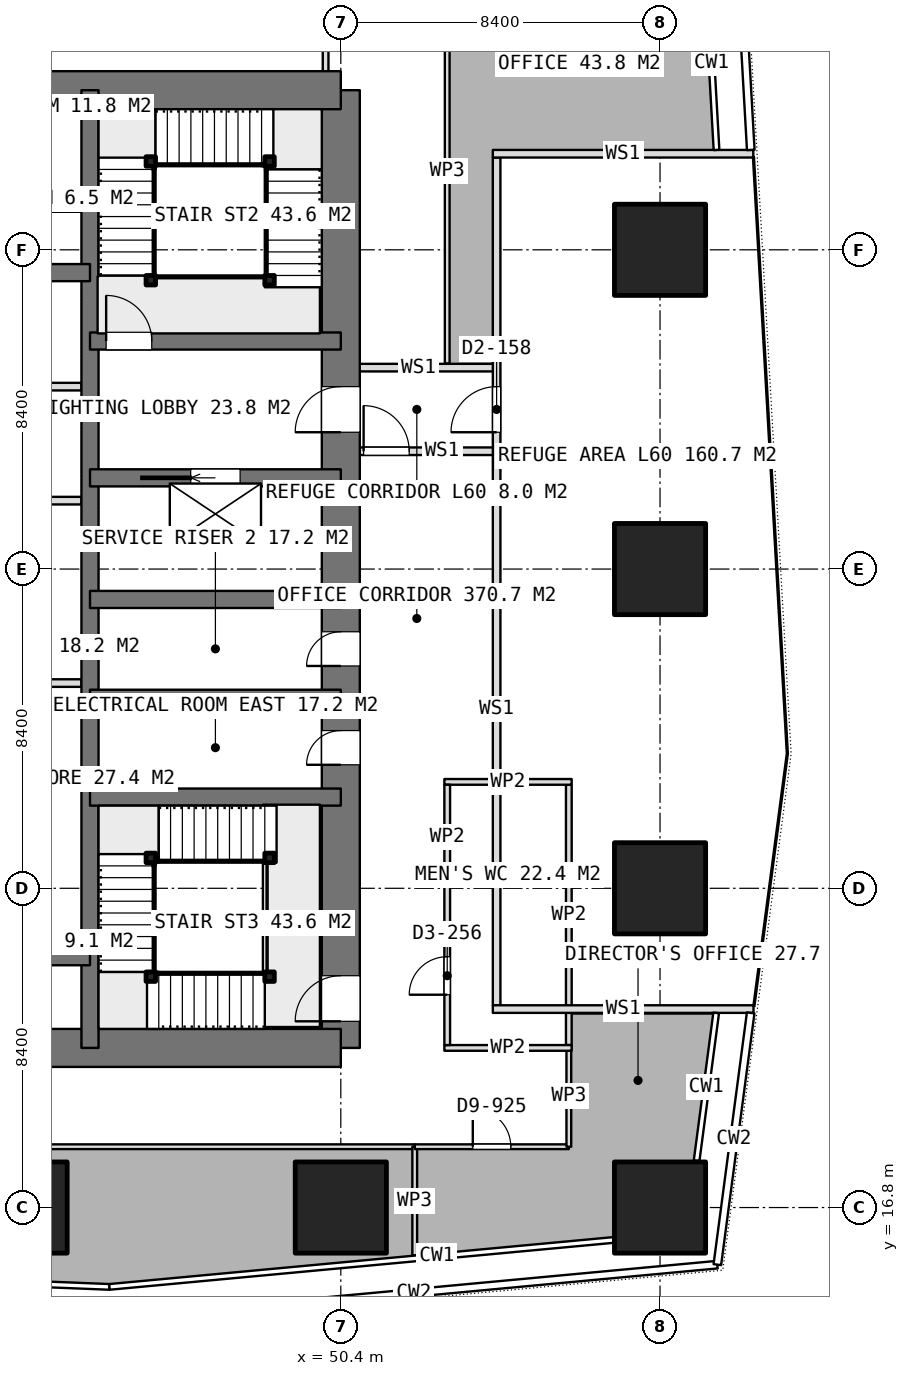
"""IFC4 building model, lengths in metres.
Left out: names, types, materials, properties, quantities, classifications, styles, units other than length and angle.
Written with IfcOpenShell. Run it as: python <this file> out.ifc"""

import sys

from ifc_helpers import new_model, si_unit, direction, frame, frame_2d, origin, origin_2d, place, context, subcontext, project, spatial, rectangle, extrude, element, fill, save


model = new_model("IFC4")
c1 = context("Model", 3, precision=1e-05, world=origin(), true_north=direction((0.0, 1.0)))
c2 = subcontext(c1, "Body", "Model", "MODEL_VIEW")
j1 = project(units=[si_unit("LENGTHUNIT", "METRE"), si_unit("PLANEANGLEUNIT", "RADIAN")], contexts=[c1])
p1 = place(None, origin())
s1 = spatial("IfcSite", under=j1, at=p1, CompositionType="ELEMENT")
p2 = place(p1, origin())
s2 = spatial("IfcBuilding", under=s1, at=p2, CompositionType="ELEMENT")
p3 = place(p2, frame((0.0, 0.0, 236.45)))
s3 = spatial("IfcBuildingStorey", under=s2, at=p3, CompositionType="ELEMENT", Elevation=236.45)
for number, where, z_axis, x_axis in (
    (1, (40.0, 21.0, 0.0), (0.0, 0.0, 1.0), (1.0, 0.0, 0.0)),
    (2, (40.0, 46.2, 0.0), (0.0, 0.0, 1.0), (1.0, 0.0, 0.0)),
):
    element("IfcWall", number, at=place(p3, frame(where, z_axis=z_axis, x_axis=x_axis)), inside=s3, PredefinedType="SHEAR", context=c2, shape_type="SweptSolid", body=[
        extrude(rectangle(XDim=10.4, YDim=1.0, at=frame_2d((5.2, 0.0))), origin(), (0.0, 0.0, 1.0), 3.75),
    ])
p4 = place(p3, frame((50.4, 21.0, 0.0), z_axis=(0.0, 0.0, 1.0), x_axis=(0.0, 1.0, 0.0)))
e3 = element("IfcWall", 3, at=p4, inside=s3, PredefinedType="SHEAR", context=c2, shape_type="SweptSolid", body=[
    extrude(rectangle(XDim=25.2, YDim=1.0, at=frame_2d((12.6, 0.0))), origin(), (0.0, 0.0, 1.0), 3.75),
])
p5 = place(p4, frame((16.2, 0.0, 0.0)))
e4 = element("IfcOpeningElement", 4, at=p5, cuts=e3, PredefinedType="OPENING", context=c2, shape_type="SweptSolid", body=[
    extrude(rectangle(XDim=1.2, YDim=2.1, at=frame_2d((0.6, 1.05))), frame((0.0, 0.51, 0.0), z_axis=(0.0, -1.0, 0.0), x_axis=(1.0, 0.0, 0.0)), (0.0, 0.0, 1.0), 1.02),
])
p6 = place(p4, frame((10.05, 0.0, 0.0)))
e5 = element("IfcOpeningElement", 5, at=p6, cuts=e3, PredefinedType="OPENING", context=c2, shape_type="SweptSolid", body=[
    extrude(rectangle(XDim=0.9, YDim=2.1, at=frame_2d((0.45, 1.05))), frame((0.0, 0.51, 0.0), z_axis=(0.0, -1.0, 0.0), x_axis=(1.0, 0.0, 0.0)), (0.0, 0.0, 1.0), 1.02),
])
p7 = place(p4, frame((7.45, 0.0, 0.0)))
e6 = element("IfcOpeningElement", 6, at=p7, cuts=e3, PredefinedType="OPENING", context=c2, shape_type="SweptSolid", body=[
    extrude(rectangle(XDim=0.9, YDim=2.1, at=frame_2d((0.45, 1.05))), frame((0.0, 0.51, 0.0), z_axis=(0.0, -1.0, 0.0), x_axis=(1.0, 0.0, 0.0)), (0.0, 0.0, 1.0), 1.02),
])
p8 = place(p4, frame((0.7, 0.0, 0.0)))
e7 = element("IfcOpeningElement", 7, at=p8, cuts=e3, PredefinedType="OPENING", context=c2, shape_type="SweptSolid", body=[
    extrude(rectangle(XDim=1.2, YDim=2.1, at=frame_2d((0.6, 1.05))), frame((0.0, 0.51, 0.0), z_axis=(0.0, -1.0, 0.0), x_axis=(1.0, 0.0, 0.0)), (0.0, 0.0, 1.0), 1.02),
])
p9 = place(p3, frame((43.8, 21.0, 0.0), z_axis=(0.0, 0.0, 1.0), x_axis=(0.0, 1.0, 0.0)))
e8 = element("IfcWall", 8, at=p9, inside=s3, PredefinedType="SHEAR", context=c2, shape_type="SweptSolid", body=[
    extrude(rectangle(XDim=25.2, YDim=0.45, at=frame_2d((12.6, 0.0))), origin(), (0.0, 0.0, 1.0), 3.75),
])
for number, where, z_axis, x_axis in (
    (9, (40.0, 23.4, 0.0), (0.0, 0.0, 1.0), (1.0, 0.0, 0.0)),
    (10, (40.0, 41.4, 0.0), (0.0, 0.0, 1.0), (1.0, 0.0, 0.0)),
):
    element("IfcWall", number, at=place(p3, frame(where, z_axis=z_axis, x_axis=x_axis)), inside=s3, PredefinedType="SHEAR", context=c2, shape_type="SweptSolid", body=[
        extrude(rectangle(XDim=3.8, YDim=0.45, at=frame_2d((1.9, 0.0))), origin(), (0.0, 0.0, 1.0), 3.75),
    ])
for number, where, z_axis, x_axis in (
    (11, (43.8, 27.6, 0.0), (0.0, 0.0, 1.0), (1.0, 0.0, 0.0)),
    (12, (43.8, 30.2, 0.0), (0.0, 0.0, 1.0), (1.0, 0.0, 0.0)),
    (13, (43.8, 32.8, 0.0), (0.0, 0.0, 1.0), (1.0, 0.0, 0.0)),
):
    element("IfcWall", number, at=place(p3, frame(where, z_axis=z_axis, x_axis=x_axis)), inside=s3, PredefinedType="SHEAR", context=c2, shape_type="SweptSolid", body=[
        extrude(rectangle(XDim=6.6, YDim=0.45, at=frame_2d((3.3, 0.0))), origin(), (0.0, 0.0, 1.0), 3.75),
    ])
p10 = place(p3, frame((43.8, 36.0, 0.0), z_axis=(0.0, 0.0, 1.0), x_axis=(1.0, 0.0, 0.0)))
e14 = element("IfcWall", 14, at=p10, inside=s3, PredefinedType="SHEAR", context=c2, shape_type="SweptSolid", body=[
    extrude(rectangle(XDim=6.6, YDim=0.45, at=frame_2d((3.3, 0.0))), origin(), (0.0, 0.0, 1.0), 3.75),
])
p11 = place(p10, frame((2.65, 0.0, 0.0)))
e15 = element("IfcOpeningElement", 15, at=p11, cuts=e14, PredefinedType="OPENING", context=c2, shape_type="SweptSolid", body=[
    extrude(rectangle(XDim=1.3, YDim=2.1, at=frame_2d((0.65, 1.05))), frame((0.0, 0.235, 0.0), z_axis=(0.0, -1.0, 0.0), x_axis=(1.0, 0.0, 0.0)), (0.0, 0.0, 1.0), 0.47),
])
p12 = place(p3, frame((43.8, 39.6, 0.0), z_axis=(0.0, 0.0, 1.0), x_axis=(1.0, 0.0, 0.0)))
e16 = element("IfcWall", 16, at=p12, inside=s3, PredefinedType="SHEAR", context=c2, shape_type="SweptSolid", body=[
    extrude(rectangle(XDim=6.6, YDim=0.45, at=frame_2d((3.3, 0.0))), origin(), (0.0, 0.0, 1.0), 3.75),
])
p13 = place(p12, frame((0.425, 0.0, 0.0)))
e17 = element("IfcOpeningElement", 17, at=p13, cuts=e16, PredefinedType="OPENING", context=c2, shape_type="SweptSolid", body=[
    extrude(rectangle(XDim=1.2, YDim=2.1, at=frame_2d((0.6, 1.05))), frame((0.0, 0.235, 0.0), z_axis=(0.0, -1.0, 0.0), x_axis=(1.0, 0.0, 0.0)), (0.0, 0.0, 1.0), 0.47),
])
for number, where, z_axis, x_axis in (
    (18, (42.0, 16.8, 0.0), (0.0, 0.0, 1.0), (1.0, 0.0, 0.0)),
    (19, (50.4, 16.8, 0.0), (0.0, 0.0, 1.0), (1.0, 0.0, 0.0)),
    (20, (58.8, 16.8, 0.0), (0.0, 0.0, 1.0), (1.0, 0.0, 0.0)),
    (21, (58.8, 25.2, 0.0), (0.0, 0.0, 1.0), (1.0, 0.0, 0.0)),
    (22, (58.8, 33.6, 0.0), (0.0, 0.0, 1.0), (1.0, 0.0, 0.0)),
    (23, (58.8, 42.0, 0.0), (0.0, 0.0, 1.0), (1.0, 0.0, 0.0)),
):
    element("IfcColumn", number, at=place(p3, frame(where, z_axis=z_axis, x_axis=x_axis)), inside=s3, PredefinedType="COLUMN", context=c2, shape_type="SweptSolid", body=[
        extrude(rectangle(XDim=2.4, YDim=2.4, at=origin_2d()), origin(), (0.0, 0.0, 1.0), 3.75),
    ])
for number, where, z_axis, x_axis in (
    (24, (40.5, 35.4, 0.0), (0.0, 0.0, 1.0), (1.0, 0.0, 0.0)),
    (25, (40.5, 38.4, 0.0), (0.0, 0.0, 1.0), (1.0, 0.0, 0.0)),
    (26, (40.5, 30.6, 0.0), (0.0, 0.0, 1.0), (1.0, 0.0, 0.0)),
):
    element("IfcWall", number, at=place(p3, frame(where, z_axis=z_axis, x_axis=x_axis)), inside=s3, PredefinedType="PARTITIONING", context=c2, shape_type="SweptSolid", body=[
        extrude(rectangle(XDim=3.075, YDim=0.2, at=frame_2d((1.538, 0.0))), origin(), (0.0, 0.0, 1.0), 3.4),
    ])
p14 = place(p3, frame((40.0, 43.1, 0.0), z_axis=(0.0, 0.0, 1.0), x_axis=(1.0, 0.0, 0.0)))
e27 = element("IfcWall", 27, at=p14, inside=s3, PredefinedType="PARTITIONING", context=c2, shape_type="SweptSolid", body=[
    extrude(rectangle(XDim=3.575, YDim=0.2, at=frame_2d((1.788, 0.0))), origin(), (0.0, 0.0, 1.0), 3.4),
])
p15 = place(p3, frame((50.0, 46.7, 0.0), z_axis=(0.0, 0.0, 1.0), x_axis=(0.0, 1.0, 0.0)))
e28 = element("IfcWall", 28, at=p15, inside=s3, PredefinedType="PARTITIONING", context=c2, shape_type="SweptSolid", body=[
    extrude(rectangle(XDim=2.625, YDim=0.15, at=frame_2d((1.312, 0.0))), origin(), (0.0, 0.0, 1.0), 3.4),
])
for number, where, z_axis, x_axis in (
    (29, (53.125, 21.0, 0.0), (0.0, 0.0, 1.0), (1.0, 0.0, 0.0)),
    (30, (53.125, 28.0, 0.0), (0.0, 0.0, 1.0), (1.0, 0.0, 0.0)),
):
    element("IfcWall", number, at=place(p3, frame(where, z_axis=z_axis, x_axis=x_axis)), inside=s3, PredefinedType="PARTITIONING", context=c2, shape_type="SweptSolid", body=[
        extrude(rectangle(XDim=3.35, YDim=0.15, at=frame_2d((1.675, 0.0))), origin(), (0.0, 0.0, 1.0), 3.4),
    ])
p16 = place(p3, frame((53.2, 21.075, 0.0), z_axis=(0.0, 0.0, 1.0), x_axis=(0.0, 1.0, 0.0)))
e31 = element("IfcWall", 31, at=p16, inside=s3, PredefinedType="PARTITIONING", context=c2, shape_type="SweptSolid", body=[
    extrude(rectangle(XDim=6.85, YDim=0.15, at=frame_2d((3.425, 0.0))), origin(), (0.0, 0.0, 1.0), 3.4),
])
p17 = place(p16, frame((1.325, 0.0, 0.0)))
e32 = element("IfcOpeningElement", 32, at=p17, cuts=e31, PredefinedType="OPENING", context=c2, shape_type="SweptSolid", body=[
    extrude(rectangle(XDim=1.0, YDim=2.1, at=frame_2d((0.5, 1.05))), frame((0.0, 0.085, 0.0), z_axis=(0.0, -1.0, 0.0), x_axis=(1.0, 0.0, 0.0)), (0.0, 0.0, 1.0), 0.17),
])
p18 = place(p3, frame((56.4, 21.075, 0.0), z_axis=(0.0, 0.0, 1.0), x_axis=(0.0, 1.0, 0.0)))
e33 = element("IfcWall", 33, at=p18, inside=s3, PredefinedType="PARTITIONING", context=c2, shape_type="SweptSolid", body=[
    extrude(rectangle(XDim=6.85, YDim=0.15, at=frame_2d((3.425, 0.0))), origin(), (0.0, 0.0, 1.0), 3.4),
])
p19 = place(p3, frame((23.944, 18.4, 0.0), z_axis=(0.0, 0.0, 1.0), x_axis=(1.0, 0.0, 0.0)))
e34 = element("IfcWall", 34, at=p19, inside=s3, PredefinedType="PARTITIONING", context=c2, shape_type="SweptSolid", body=[
    extrude(rectangle(XDim=28.401, YDim=0.125, at=frame_2d((14.2, 0.0))), origin(), (0.0, 0.0, 1.0), 3.4),
])
p20 = place(p19, frame((13.701, 0.0, 0.0)))
e35 = element("IfcOpeningElement", 35, at=p20, cuts=e34, PredefinedType="OPENING", context=c2, shape_type="SweptSolid", body=[
    extrude(rectangle(XDim=1.0, YDim=2.1, at=frame_2d((0.5, 1.05))), frame((0.0, 0.073, 0.0), z_axis=(0.0, -1.0, 0.0), x_axis=(1.0, 0.0, 0.0)), (0.0, 0.0, 1.0), 0.145),
])
p21 = place(p3, frame((52.345, 18.4, 0.0), z_axis=(0.0, 0.0, 1.0), x_axis=(0.0, -1.0, 0.0)))
e36 = element("IfcWall", 36, at=p21, inside=s3, PredefinedType="PARTITIONING", context=c2, shape_type="SweptSolid", body=[
    extrude(rectangle(XDim=2.86, YDim=0.125, at=frame_2d((1.43, 0.0))), origin(), (0.0, 0.0, 1.0), 3.4),
])
p22 = place(p3, frame((52.346, 18.4, 0.0), z_axis=(0.0, 0.0, 1.0), x_axis=(1.0, 0.0, 0.0)))
e37 = element("IfcWall", 37, at=p22, inside=s3, PredefinedType="PARTITIONING", context=c2, shape_type="SweptSolid", body=[
    extrude(rectangle(XDim=4.054, YDim=0.125, at=frame_2d((2.027, 0.0))), origin(), (0.0, 0.0, 1.0), 3.4),
])
p23 = place(p22, frame((1.527, 0.0, 0.0)))
e38 = element("IfcOpeningElement", 38, at=p23, cuts=e37, PredefinedType="OPENING", context=c2, shape_type="SweptSolid", body=[
    extrude(rectangle(XDim=1.0, YDim=2.1, at=frame_2d((0.5, 1.05))), frame((0.0, 0.073, 0.0), z_axis=(0.0, -1.0, 0.0), x_axis=(1.0, 0.0, 0.0)), (0.0, 0.0, 1.0), 0.145),
])
p24 = place(p3, frame((56.4, 18.4, 0.0), z_axis=(0.0, 0.0, 1.0), x_axis=(0.0, 1.0, 0.0)))
e39 = element("IfcWall", 39, at=p24, inside=s3, PredefinedType="PARTITIONING", context=c2, shape_type="SweptSolid", body=[
    extrude(rectangle(XDim=2.675, YDim=0.125, at=frame_2d((1.337, 0.0))), origin(), (0.0, 0.0, 1.0), 3.4),
])
p25 = place(p3, frame((53.2, 39.011, 0.0), z_axis=(0.0, 0.0, 1.0), x_axis=(0.0, 1.0, 0.0)))
e40 = element("IfcWall", 40, at=p25, inside=s3, PredefinedType="PARTITIONING", context=c2, shape_type="SweptSolid", body=[
    extrude(rectangle(XDim=10.118, YDim=0.125, at=frame_2d((5.059, 0.0))), origin(), (0.0, 0.0, 1.0), 3.4),
])
for number, where, z_axis, x_axis in (
    (41, (45.4, 41.2, 0.0), (0.0, 0.0, 1.0), (1.0, 0.0, 0.0)),
    (42, (45.4, 44.325, 0.0), (0.0, 0.0, 1.0), (1.0, 0.0, 0.0)),
    (43, (48.525, 44.325, 0.0), (0.0, 0.0, 1.0), (1.0, 0.0, 0.0)),
    (44, (48.525, 41.2, 0.0), (0.0, 0.0, 1.0), (1.0, 0.0, 0.0)),
    (45, (48.525, 22.875, 0.0), (0.0, 0.0, 1.0), (1.0, 0.0, 0.0)),
    (46, (45.4, 22.875, 0.0), (0.0, 0.0, 1.0), (1.0, 0.0, 0.0)),
    (47, (45.4, 26.0, 0.0), (0.0, 0.0, 1.0), (1.0, 0.0, 0.0)),
    (48, (48.525, 26.0, 0.0), (0.0, 0.0, 1.0), (1.0, 0.0, 0.0)),
):
    element("IfcColumn", number, at=place(p3, frame(where, z_axis=z_axis, x_axis=x_axis)), inside=s3, PredefinedType="COLUMN", context=c2, shape_type="SweptSolid", body=[
        extrude(rectangle(XDim=0.25, YDim=0.25, at=origin_2d()), origin(), (0.0, 0.0, 1.0), 3.75),
    ])
p26 = place(p3, frame((54.5, 22.122, 0.0), z_axis=(0.0, 0.0, 1.0), x_axis=(0.0, 1.0, 0.0)))
e49 = element("IfcWall", 49, at=p26, inside=s3, PredefinedType="PARTITIONING", context=c2, shape_type="SweptSolid", body=[
    extrude(rectangle(XDim=22.306, YDim=0.2, at=frame_2d((11.153, 0.0))), origin(), (0.0, 0.0, 1.0), 3.4),
])
p27 = place(p26, frame((15.078, 0.0, 0.0)))
e50 = element("IfcOpeningElement", 50, at=p27, cuts=e49, PredefinedType="OPENING", context=c2, shape_type="SweptSolid", body=[
    extrude(rectangle(XDim=1.2, YDim=2.1, at=frame_2d((0.6, 1.05))), frame((0.0, 0.11, 0.0), z_axis=(0.0, -1.0, 0.0), x_axis=(1.0, 0.0, 0.0)), (0.0, 0.0, 1.0), 0.22),
])
p28 = place(p3, frame((54.4, 22.022, 0.0), z_axis=(0.0, 0.0, 1.0), x_axis=(1.0, 0.0, 0.0)))
e51 = element("IfcWall", 51, at=p28, inside=s3, PredefinedType="PARTITIONING", context=c2, shape_type="SweptSolid", body=[
    extrude(rectangle(XDim=6.86, YDim=0.2, at=frame_2d((3.43, 0.0))), origin(), (0.0, 0.0, 1.0), 3.4),
])
p29 = place(p3, frame((54.4, 44.528, 0.0), z_axis=(0.0, 0.0, 1.0), x_axis=(1.0, 0.0, 0.0)))
e52 = element("IfcWall", 52, at=p29, inside=s3, PredefinedType="PARTITIONING", context=c2, shape_type="SweptSolid", body=[
    extrude(rectangle(XDim=6.854, YDim=0.2, at=frame_2d((3.427, 0.0))), origin(), (0.0, 0.0, 1.0), 3.4),
])
p30 = place(p3, frame((50.4, 38.9, 0.0), z_axis=(0.0, 0.0, 1.0), x_axis=(1.0, 0.0, 0.0)))
e53 = element("IfcWall", 53, at=p30, inside=s3, PredefinedType="PARTITIONING", context=c2, shape_type="SweptSolid", body=[
    extrude(rectangle(XDim=4.1, YDim=0.2, at=frame_2d((2.05, 0.0))), origin(), (0.0, 0.0, 1.0), 3.4),
])
p31 = place(p3, frame((50.4, 36.7, 0.0), z_axis=(0.0, 0.0, 1.0), x_axis=(1.0, 0.0, 0.0)))
e54 = element("IfcWall", 54, at=p31, inside=s3, PredefinedType="PARTITIONING", context=c2, shape_type="SweptSolid", body=[
    extrude(rectangle(XDim=4.1, YDim=0.2, at=frame_2d((2.05, 0.0))), origin(), (0.0, 0.0, 1.0), 3.4),
])
p32 = place(p31, frame((0.6, 0.0, 0.0)))
e55 = element("IfcOpeningElement", 55, at=p32, cuts=e54, PredefinedType="OPENING", context=c2, shape_type="SweptSolid", body=[
    extrude(rectangle(XDim=1.2, YDim=2.1, at=frame_2d((0.6, 1.05))), frame((0.0, 0.11, 0.0), z_axis=(0.0, -1.0, 0.0), x_axis=(1.0, 0.0, 0.0)), (0.0, 0.0, 1.0), 0.22),
])
p33 = place(p5, origin())
e56 = element("IfcDoor", 56, at=p33, inside=s3, OperationType="SINGLE_SWING_LEFT", PredefinedType="DOOR", context=c2, shape_type="SweptSolid", body=[
    extrude(rectangle(XDim=1.2, YDim=2.1, at=frame_2d((0.6, 1.05))), frame((0.0, 0.025, 0.0), z_axis=(0.0, -1.0, 0.0), x_axis=(1.0, 0.0, 0.0)), (0.0, 0.0, 1.0), 0.05),
])
fill(e4, e56)
p34 = place(p6, origin())
e57 = element("IfcDoor", 57, at=p34, inside=s3, OperationType="SINGLE_SWING_LEFT", PredefinedType="DOOR", context=c2, shape_type="SweptSolid", body=[
    extrude(rectangle(XDim=0.9, YDim=2.1, at=frame_2d((0.45, 1.05))), frame((0.0, 0.025, 0.0), z_axis=(0.0, -1.0, 0.0), x_axis=(1.0, 0.0, 0.0)), (0.0, 0.0, 1.0), 0.05),
])
fill(e5, e57)
p35 = place(p7, origin())
e58 = element("IfcDoor", 58, at=p35, inside=s3, OperationType="SINGLE_SWING_LEFT", PredefinedType="DOOR", context=c2, shape_type="SweptSolid", body=[
    extrude(rectangle(XDim=0.9, YDim=2.1, at=frame_2d((0.45, 1.05))), frame((0.0, 0.025, 0.0), z_axis=(0.0, -1.0, 0.0), x_axis=(1.0, 0.0, 0.0)), (0.0, 0.0, 1.0), 0.05),
])
fill(e6, e58)
p36 = place(p11, origin())
e59 = element("IfcDoor", 59, at=p36, inside=s3, OperationType="SLIDING_TO_LEFT", PredefinedType="USERDEFINED", context=c2, shape_type="SweptSolid", body=[
    extrude(rectangle(XDim=1.3, YDim=2.1, at=frame_2d((0.65, 1.05))), frame((0.0, 0.025, 0.0), z_axis=(0.0, -1.0, 0.0), x_axis=(1.0, 0.0, 0.0)), (0.0, 0.0, 1.0), 0.05),
])
fill(e15, e59)
p37 = place(p17, origin())
e60 = element("IfcDoor", 60, at=p37, inside=s3, OperationType="SINGLE_SWING_LEFT", PredefinedType="DOOR", context=c2, shape_type="SweptSolid", body=[
    extrude(rectangle(XDim=1.0, YDim=2.1, at=frame_2d((0.5, 1.05))), frame((0.0, 0.025, 0.0), z_axis=(0.0, -1.0, 0.0), x_axis=(1.0, 0.0, 0.0)), (0.0, 0.0, 1.0), 0.05),
])
fill(e32, e60)
p38 = place(p23, origin())
e61 = element("IfcDoor", 61, at=p38, inside=s3, OperationType="SINGLE_SWING_LEFT", PredefinedType="DOOR", context=c2, shape_type="SweptSolid", body=[
    extrude(rectangle(XDim=1.0, YDim=2.1, at=frame_2d((0.5, 1.05))), frame((0.0, 0.025, 0.0), z_axis=(0.0, -1.0, 0.0), x_axis=(1.0, 0.0, 0.0)), (0.0, 0.0, 1.0), 0.05),
])
fill(e38, e61)
p39 = place(p13, origin())
e62 = element("IfcDoor", 62, at=p39, inside=s3, OperationType="SINGLE_SWING_RIGHT", PredefinedType="DOOR", context=c2, shape_type="SweptSolid", body=[
    extrude(rectangle(XDim=1.2, YDim=2.1, at=frame_2d((0.6, 1.05))), frame((0.0, 0.025, 0.0), z_axis=(0.0, -1.0, 0.0), x_axis=(1.0, 0.0, 0.0)), (0.0, 0.0, 1.0), 0.05),
])
fill(e17, e62)
p40 = place(p8, origin())
e63 = element("IfcDoor", 63, at=p40, inside=s3, OperationType="SINGLE_SWING_RIGHT", PredefinedType="DOOR", context=c2, shape_type="SweptSolid", body=[
    extrude(rectangle(XDim=1.2, YDim=2.1, at=frame_2d((0.6, 1.05))), frame((0.0, 0.025, 0.0), z_axis=(0.0, -1.0, 0.0), x_axis=(1.0, 0.0, 0.0)), (0.0, 0.0, 1.0), 0.05),
])
fill(e7, e63)
p41 = place(p27, origin())
e64 = element("IfcDoor", 64, at=p41, inside=s3, OperationType="SINGLE_SWING_LEFT", PredefinedType="DOOR", context=c2, shape_type="SweptSolid", body=[
    extrude(rectangle(XDim=1.2, YDim=2.1, at=frame_2d((0.6, 1.05))), frame((0.0, 0.025, 0.0), z_axis=(0.0, -1.0, 0.0), x_axis=(1.0, 0.0, 0.0)), (0.0, 0.0, 1.0), 0.05),
])
fill(e50, e64)
p42 = place(p32, origin())
e65 = element("IfcDoor", 65, at=p42, inside=s3, OperationType="SINGLE_SWING_LEFT", PredefinedType="DOOR", context=c2, shape_type="SweptSolid", body=[
    extrude(rectangle(XDim=1.2, YDim=2.1, at=frame_2d((0.6, 1.05))), frame((0.0, 0.025, 0.0), z_axis=(0.0, -1.0, 0.0), x_axis=(1.0, 0.0, 0.0)), (0.0, 0.0, 1.0), 0.05),
])
fill(e55, e65)
save(model, sys.argv[1])
